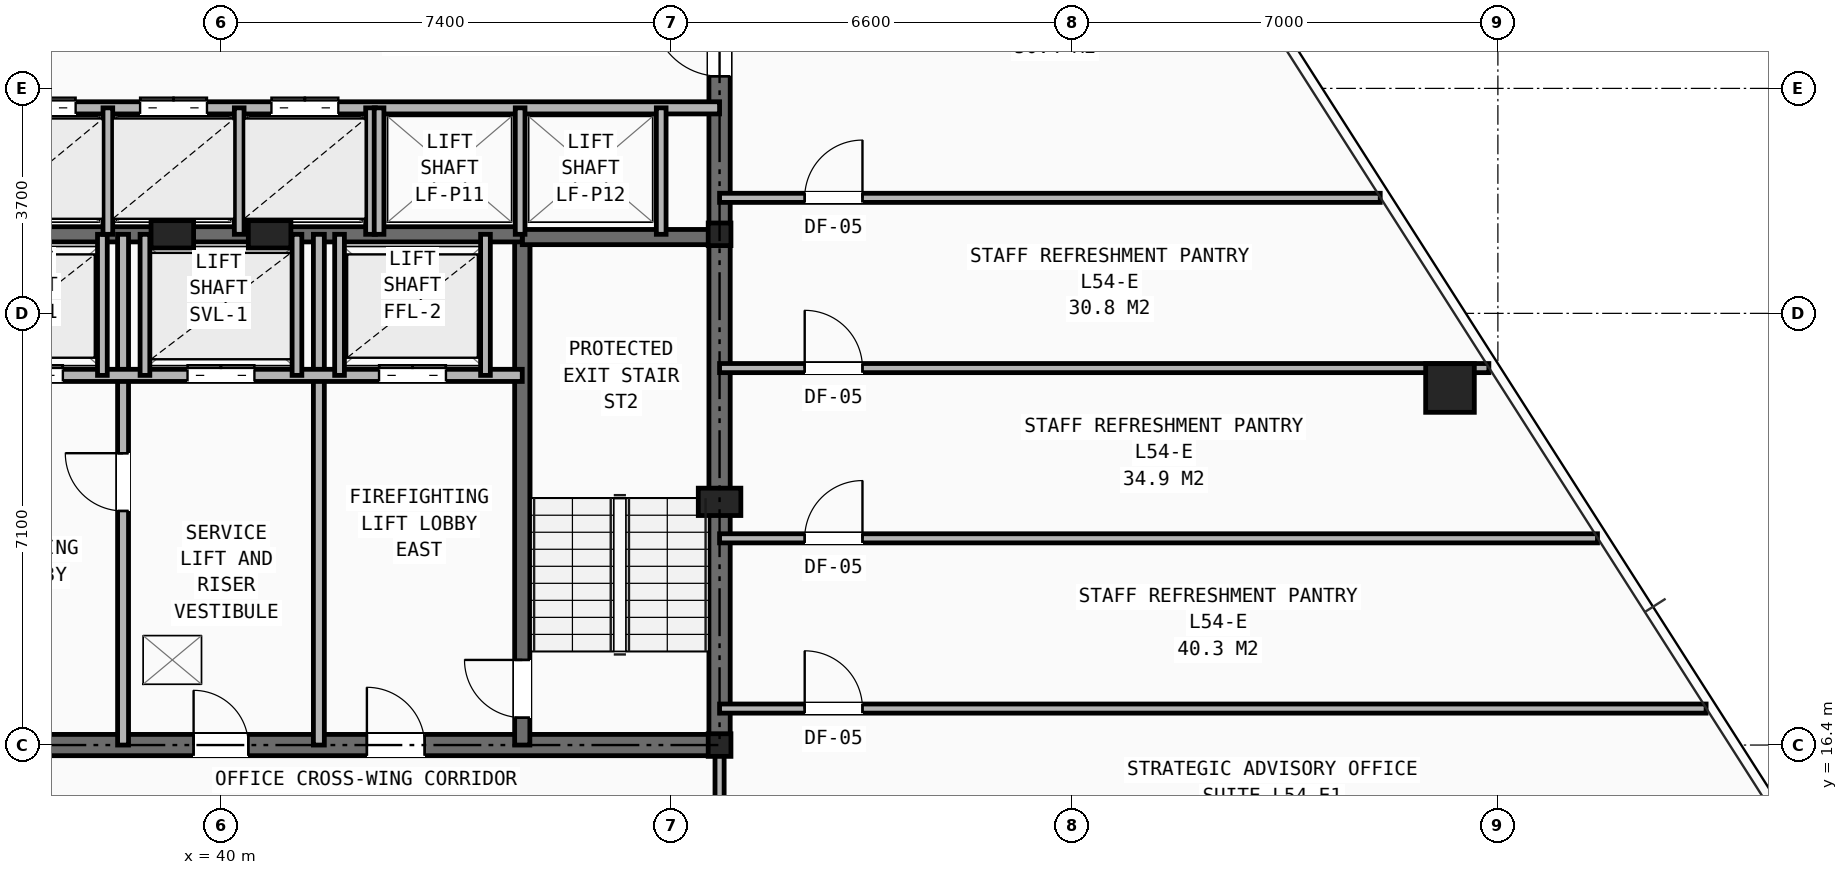
"""IFC4 building model, lengths in metres.
Left out: names, types, materials, properties, quantities, classifications, styles, units other than length and angle.
Written with IfcOpenShell. Run it as: python <this file> out.ifc"""

import sys

from ifc_helpers import new_model, si_unit, direction, frame, frame_2d, origin, origin_2d, place, context, subcontext, project, spatial, rectangle, hollow_rectangle, i_section, extrude, element, fill, save


model = new_model("IFC4")
c1 = context("Model", 3, precision=1e-05, world=origin(), true_north=direction((0.0, 1.0)))
c2 = subcontext(c1, "Body", "Model", "MODEL_VIEW")
j1 = project(units=[si_unit("LENGTHUNIT", "METRE"), si_unit("PLANEANGLEUNIT", "RADIAN")], contexts=[c1])
p1 = place(None, origin())
s1 = spatial("IfcSite", under=j1, at=p1, CompositionType="ELEMENT")
p2 = place(p1, origin())
s2 = spatial("IfcBuilding", under=s1, at=p2, CompositionType="ELEMENT")
p3 = place(p2, frame((0.0, 0.0, 189.6)))
s3 = spatial("IfcBuildingStorey", under=s2, at=p3, CompositionType="ELEMENT", Elevation=189.6)
for number, where, z_axis, x_axis in (
    (1, (48.2, 16.4, 0.0), (0.0, 0.0, 1.0), (1.0, 0.0, 0.0)),
    (2, (48.2, 24.8, 0.0), (0.0, 0.0, 1.0), (1.0, 0.0, 0.0)),
):
    element("IfcColumn", number, at=place(p3, frame(where, z_axis=z_axis, x_axis=x_axis)), inside=s3, PredefinedType="COLUMN", context=c2, shape_type="SweptSolid", body=[
        extrude(i_section(OverallWidth=0.374, OverallDepth=0.372, WebThickness=0.016, FlangeThickness=0.026, at=origin_2d()), origin(), (0.0, 0.0, 1.0), 3.45),
    ])
for number, where, z_axis, x_axis in (
    (3, (48.2, 20.4, 0.0), (0.0, 0.0, 1.0), (1.0, 0.0, 0.0)),
    (4, (39.2, 24.8, 0.0), (0.0, 0.0, 1.0), (1.0, 0.0, 0.0)),
    (5, (40.8, 24.8, 0.0), (0.0, 0.0, 1.0), (1.0, 0.0, 0.0)),
):
    element("IfcColumn", number, at=place(p3, frame(where, z_axis=z_axis, x_axis=x_axis)), inside=s3, PredefinedType="PILASTER", context=c2, shape_type="SweptSolid", body=[
        extrude(rectangle(XDim=0.7, YDim=0.45, at=origin_2d()), origin(), (0.0, 0.0, 1.0), 3.45),
    ])
p4 = place(p3, frame((60.212, 22.272, 0.0), z_axis=(0.0, 0.0, 1.0), x_axis=(1.0, 0.0, 0.0)))
e6 = element("IfcColumn", 6, at=p4, inside=s3, PredefinedType="COLUMN", context=c2, shape_type="SweptSolid", body=[
    extrude(hollow_rectangle(XDim=0.8, YDim=0.8, WallThickness=0.055, at=origin_2d()), origin(), (0.0, 0.0, 1.0), 3.45),
])
p5 = place(p3, frame((31.8, 16.4, 0.0), z_axis=(0.0, 0.0, 1.0), x_axis=(1.0, 0.0, 0.0)))
e7 = element("IfcWall", 7, at=p5, inside=s3, PredefinedType="SHEAR", context=c2, shape_type="SweptSolid", body=[
    extrude(rectangle(XDim=16.4, YDim=0.35, at=frame_2d((8.2, 0.0))), origin(), (0.0, 0.0, 1.0), 3.21),
])
p6 = place(p5, frame((7.75, 0.0, 0.0)))
e8 = element("IfcOpeningElement", 8, at=p6, cuts=e7, PredefinedType="OPENING", context=c2, shape_type="SweptSolid", body=[
    extrude(rectangle(XDim=0.9, YDim=2.1, at=frame_2d((0.45, 1.05))), frame((0.0, 0.185, 0.0), z_axis=(0.0, -1.0, 0.0), x_axis=(1.0, 0.0, 0.0)), (0.0, 0.0, 1.0), 0.37),
])
p7 = place(p5, frame((4.2, 0.0, 0.0)))
e9 = element("IfcOpeningElement", 9, at=p7, cuts=e7, PredefinedType="OPENING", context=c2, shape_type="SweptSolid", body=[
    extrude(rectangle(XDim=0.95, YDim=2.1, at=frame_2d((0.475, 1.05))), frame((0.0, 0.185, 0.0), z_axis=(0.0, -1.0, 0.0), x_axis=(1.0, 0.0, 0.0)), (0.0, 0.0, 1.0), 0.37),
])
p8 = place(p5, frame((10.6, 0.0, 0.0)))
e10 = element("IfcOpeningElement", 10, at=p8, cuts=e7, PredefinedType="OPENING", context=c2, shape_type="SweptSolid", body=[
    extrude(rectangle(XDim=0.95, YDim=2.1, at=frame_2d((0.475, 1.05))), frame((0.0, 0.185, 0.0), z_axis=(0.0, -1.0, 0.0), x_axis=(1.0, 0.0, 0.0)), (0.0, 0.0, 1.0), 0.37),
])
p9 = place(p3, frame((48.2, 16.4, 0.0), z_axis=(0.0, 0.0, 1.0), x_axis=(0.0, 1.0, 0.0)))
e11 = element("IfcWall", 11, at=p9, inside=s3, PredefinedType="SHEAR", context=c2, shape_type="SweptSolid", body=[
    extrude(rectangle(XDim=14.8, YDim=0.35, at=frame_2d((7.4, 0.0))), origin(), (0.0, 0.0, 1.0), 3.21),
])
p10 = place(p9, frame((11.0, 0.0, 0.0)))
e12 = element("IfcOpeningElement", 12, at=p10, cuts=e11, PredefinedType="OPENING", context=c2, shape_type="SweptSolid", body=[
    extrude(rectangle(XDim=1.1, YDim=2.15, at=frame_2d((0.55, 1.075))), frame((0.0, 0.185, 0.0), z_axis=(0.0, -1.0, 0.0), x_axis=(1.0, 0.0, 0.0)), (0.0, 0.0, 1.0), 0.37),
])
p11 = place(p3, frame((44.955, 16.4, 0.0), z_axis=(0.0, 0.0, 1.0), x_axis=(0.0, 1.0, 0.0)))
e13 = element("IfcWall", 13, at=p11, inside=s3, PredefinedType="SHEAR", context=c2, shape_type="SweptSolid", body=[
    extrude(rectangle(XDim=8.4, YDim=0.25, at=frame_2d((4.2, 0.0))), origin(), (0.0, 0.0, 1.0), 3.21),
])
p12 = place(p11, frame((0.45, 0.0, 0.0)))
e14 = element("IfcOpeningElement", 14, at=p12, cuts=e13, PredefinedType="OPENING", context=c2, shape_type="SweptSolid", body=[
    extrude(rectangle(XDim=0.95, YDim=2.1, at=frame_2d((0.475, 1.05))), frame((0.0, 0.135, 0.0), z_axis=(0.0, -1.0, 0.0), x_axis=(1.0, 0.0, 0.0)), (0.0, 0.0, 1.0), 0.27),
])
p13 = place(p3, frame((44.955, 24.755, 0.0), z_axis=(0.0, 0.0, 1.0), x_axis=(1.0, 0.0, 0.0)))
e15 = element("IfcWall", 15, at=p13, inside=s3, PredefinedType="SHEAR", context=c2, shape_type="SweptSolid", body=[
    extrude(rectangle(XDim=3.245, YDim=0.25, at=frame_2d((1.623, 0.0))), origin(), (0.0, 0.0, 1.0), 3.21),
])
p14 = place(p3, frame((35.045, 24.8, 0.0), z_axis=(0.0, 0.0, 1.0), x_axis=(1.0, 0.0, 0.0)))
e16 = element("IfcWall", 16, at=p14, inside=s3, PredefinedType="SHEAR", context=c2, shape_type="SweptSolid", body=[
    extrude(rectangle(XDim=9.91, YDim=0.25, at=frame_2d((4.955, 0.0))), origin(), (0.0, 0.0, 1.0), 3.21),
])
p15 = place(p3, frame((38.39, 16.4, 0.0), z_axis=(0.0, 0.0, 1.0), x_axis=(0.0, 1.0, 0.0)))
e17 = element("IfcWall", 17, at=p15, inside=s3, PredefinedType="PARTITIONING", context=c2, shape_type="SweptSolid", body=[
    extrude(rectangle(XDim=8.4, YDim=0.18, at=frame_2d((4.2, 0.0))), origin(), (0.0, 0.0, 1.0), 2.665),
])
p16 = place(p15, frame((3.85, 0.0, 0.0)))
e18 = element("IfcOpeningElement", 18, at=p16, cuts=e17, PredefinedType="OPENING", context=c2, shape_type="SweptSolid", body=[
    extrude(rectangle(XDim=0.95, YDim=2.1, at=frame_2d((0.475, 1.05))), frame((0.0, 0.1, 0.0), z_axis=(0.0, -1.0, 0.0), x_axis=(1.0, 0.0, 0.0)), (0.0, 0.0, 1.0), 0.2),
])
p17 = place(p3, frame((41.61, 16.4, 0.0), z_axis=(0.0, 0.0, 1.0), x_axis=(0.0, 1.0, 0.0)))
e19 = element("IfcWall", 19, at=p17, inside=s3, PredefinedType="PARTITIONING", context=c2, shape_type="SweptSolid", body=[
    extrude(rectangle(XDim=8.4, YDim=0.18, at=frame_2d((4.2, 0.0))), origin(), (0.0, 0.0, 1.0), 2.665),
])
p18 = place(p3, frame((35.045, 22.48, 0.0), z_axis=(0.0, 0.0, 1.0), x_axis=(1.0, 0.0, 0.0)))
e20 = element("IfcWall", 20, at=p18, inside=s3, PredefinedType="SOLIDWALL", context=c2, shape_type="SweptSolid", body=[
    extrude(rectangle(XDim=9.91, YDim=0.2, at=frame_2d((4.955, 0.0))), origin(), (0.0, 0.0, 1.0), 3.21),
])
p19 = place(p18, frame((1.255, 0.0, 0.0)))
e21 = element("IfcOpeningElement", 21, at=p19, cuts=e20, PredefinedType="OPENING", context=c2, shape_type="SweptSolid", body=[
    extrude(rectangle(XDim=1.1, YDim=2.15, at=frame_2d((0.55, 1.075))), frame((0.0, 0.11, 0.0), z_axis=(0.0, -1.0, 0.0), x_axis=(1.0, 0.0, 0.0)), (0.0, 0.0, 1.0), 0.22),
])
p20 = place(p18, frame((7.555, 0.0, 0.0)))
e22 = element("IfcOpeningElement", 22, at=p20, cuts=e20, PredefinedType="OPENING", context=c2, shape_type="SweptSolid", body=[
    extrude(rectangle(XDim=1.1, YDim=2.15, at=frame_2d((0.55, 1.075))), frame((0.0, 0.11, 0.0), z_axis=(0.0, -1.0, 0.0), x_axis=(1.0, 0.0, 0.0)), (0.0, 0.0, 1.0), 0.22),
])
p21 = place(p18, frame((4.405, 0.0, 0.0)))
e23 = element("IfcOpeningElement", 23, at=p21, cuts=e20, PredefinedType="OPENING", context=c2, shape_type="SweptSolid", body=[
    extrude(rectangle(XDim=1.1, YDim=2.15, at=frame_2d((0.55, 1.075))), frame((0.0, 0.11, 0.0), z_axis=(0.0, -1.0, 0.0), x_axis=(1.0, 0.0, 0.0)), (0.0, 0.0, 1.0), 0.22),
])
for number, where, z_axis, x_axis in (
    (24, (38.05, 22.48, 0.0), (0.0, 0.0, 1.0), (0.0, 1.0, 0.0)),
    (25, (41.95, 22.48, 0.0), (0.0, 0.0, 1.0), (0.0, 1.0, 0.0)),
    (26, (44.35, 22.48, 0.0), (0.0, 0.0, 1.0), (0.0, 1.0, 0.0)),
    (27, (38.75, 22.48, 0.0), (0.0, 0.0, 1.0), (0.0, 1.0, 0.0)),
    (28, (41.25, 22.48, 0.0), (0.0, 0.0, 1.0), (0.0, 1.0, 0.0)),
):
    element("IfcWall", number, at=place(p3, frame(where, z_axis=z_axis, x_axis=x_axis)), inside=s3, PredefinedType="SOLIDWALL", context=c2, shape_type="SweptSolid", body=[
        extrude(rectangle(XDim=2.32, YDim=0.16, at=frame_2d((1.16, 0.0))), origin(), (0.0, 0.0, 1.0), 3.21),
    ])
p22 = place(p3, frame((31.8, 26.88, 0.0), z_axis=(0.0, 0.0, 1.0), x_axis=(1.0, 0.0, 0.0)))
e29 = element("IfcWall", 29, at=p22, inside=s3, PredefinedType="SOLIDWALL", context=c2, shape_type="SweptSolid", body=[
    extrude(rectangle(XDim=16.4, YDim=0.2, at=frame_2d((8.2, 0.0))), origin(), (0.0, 0.0, 1.0), 2.665),
])
p23 = place(p22, frame((0.55, 0.0, 0.0)))
e30 = element("IfcOpeningElement", 30, at=p23, cuts=e29, PredefinedType="OPENING", context=c2, shape_type="SweptSolid", body=[
    extrude(rectangle(XDim=0.85, YDim=2.05, at=frame_2d((0.425, 1.025))), frame((0.0, 0.11, 0.0), z_axis=(0.0, -1.0, 0.0), x_axis=(1.0, 0.0, 0.0)), (0.0, 0.0, 1.0), 0.22),
])
p24 = place(p22, frame((2.55, 0.0, 0.0)))
e31 = element("IfcOpeningElement", 31, at=p24, cuts=e29, PredefinedType="OPENING", context=c2, shape_type="SweptSolid", body=[
    extrude(rectangle(XDim=1.1, YDim=2.15, at=frame_2d((0.55, 1.075))), frame((0.0, 0.11, 0.0), z_axis=(0.0, -1.0, 0.0), x_axis=(1.0, 0.0, 0.0)), (0.0, 0.0, 1.0), 0.22),
])
p25 = place(p22, frame((4.71, 0.0, 0.0)))
e32 = element("IfcOpeningElement", 32, at=p25, cuts=e29, PredefinedType="OPENING", context=c2, shape_type="SweptSolid", body=[
    extrude(rectangle(XDim=1.1, YDim=2.15, at=frame_2d((0.55, 1.075))), frame((0.0, 0.11, 0.0), z_axis=(0.0, -1.0, 0.0), x_axis=(1.0, 0.0, 0.0)), (0.0, 0.0, 1.0), 0.22),
])
p26 = place(p22, frame((6.87, 0.0, 0.0)))
e33 = element("IfcOpeningElement", 33, at=p26, cuts=e29, PredefinedType="OPENING", context=c2, shape_type="SweptSolid", body=[
    extrude(rectangle(XDim=1.1, YDim=2.15, at=frame_2d((0.55, 1.075))), frame((0.0, 0.11, 0.0), z_axis=(0.0, -1.0, 0.0), x_axis=(1.0, 0.0, 0.0)), (0.0, 0.0, 1.0), 0.22),
])
p27 = place(p22, frame((9.03, 0.0, 0.0)))
e34 = element("IfcOpeningElement", 34, at=p27, cuts=e29, PredefinedType="OPENING", context=c2, shape_type="SweptSolid", body=[
    extrude(rectangle(XDim=1.1, YDim=2.15, at=frame_2d((0.55, 1.075))), frame((0.0, 0.11, 0.0), z_axis=(0.0, -1.0, 0.0), x_axis=(1.0, 0.0, 0.0)), (0.0, 0.0, 1.0), 0.22),
])
for number, where, z_axis, x_axis in (
    (35, (38.14, 24.8, 0.0), (0.0, 0.0, 1.0), (0.0, 1.0, 0.0)),
    (36, (40.3, 24.8, 0.0), (0.0, 0.0, 1.0), (0.0, 1.0, 0.0)),
    (37, (42.46, 24.8, 0.0), (0.0, 0.0, 1.0), (0.0, 1.0, 0.0)),
    (38, (42.6, 24.8, 0.0), (0.0, 0.0, 1.0), (0.0, 1.0, 0.0)),
    (39, (44.92, 24.8, 0.0), (0.0, 0.0, 1.0), (0.0, 1.0, 0.0)),
    (40, (47.24, 24.8, 0.0), (0.0, 0.0, 1.0), (0.0, 1.0, 0.0)),
):
    element("IfcWall", number, at=place(p3, frame(where, z_axis=z_axis, x_axis=x_axis)), inside=s3, PredefinedType="SOLIDWALL", context=c2, shape_type="SweptSolid", body=[
        extrude(rectangle(XDim=2.08, YDim=0.16, at=frame_2d((1.04, 0.0))), origin(), (0.0, 0.0, 1.0), 3.21),
    ])
p28 = place(p3, frame((48.2, 14.1, 0.0), z_axis=(0.0, 0.0, 1.0), x_axis=(0.0, 1.0, 0.0)))
e41 = element("IfcWall", 41, at=p28, inside=s3, PredefinedType="PARTITIONING", context=c2, shape_type="SweptSolid", body=[
    extrude(rectangle(XDim=2.3, YDim=0.15, at=frame_2d((1.15, 0.0))), origin(), (0.0, 0.0, 1.0), 2.665),
])
p29 = place(p3, frame((48.2, 17.0, 0.0), z_axis=(0.0, 0.0, 1.0), x_axis=(1.0, 0.0, 0.0)))
e42 = element("IfcWall", 42, at=p29, inside=s3, PredefinedType="PARTITIONING", context=c2, shape_type="SweptSolid", body=[
    extrude(rectangle(XDim=16.224, YDim=0.15, at=frame_2d((8.112, 0.0))), origin(), (0.0, 0.0, 1.0), 2.589),
])
p30 = place(p29, frame((1.4, 0.0, 0.0)))
e43 = element("IfcOpeningElement", 43, at=p30, cuts=e42, PredefinedType="OPENING", context=c2, shape_type="SweptSolid", body=[
    extrude(rectangle(XDim=0.95, YDim=2.1, at=frame_2d((0.475, 1.05))), frame((0.0, 0.085, 0.0), z_axis=(0.0, -1.0, 0.0), x_axis=(1.0, 0.0, 0.0)), (0.0, 0.0, 1.0), 0.17),
])
p31 = place(p3, frame((48.2, 19.8, 0.0), z_axis=(0.0, 0.0, 1.0), x_axis=(1.0, 0.0, 0.0)))
e44 = element("IfcWall", 44, at=p31, inside=s3, PredefinedType="PARTITIONING", context=c2, shape_type="SweptSolid", body=[
    extrude(rectangle(XDim=14.438, YDim=0.15, at=frame_2d((7.219, 0.0))), origin(), (0.0, 0.0, 1.0), 2.589),
])
p32 = place(p31, frame((1.4, 0.0, 0.0)))
e45 = element("IfcOpeningElement", 45, at=p32, cuts=e44, PredefinedType="OPENING", context=c2, shape_type="SweptSolid", body=[
    extrude(rectangle(XDim=0.95, YDim=2.1, at=frame_2d((0.475, 1.05))), frame((0.0, 0.085, 0.0), z_axis=(0.0, -1.0, 0.0), x_axis=(1.0, 0.0, 0.0)), (0.0, 0.0, 1.0), 0.17),
])
p33 = place(p3, frame((48.2, 22.6, 0.0), z_axis=(0.0, 0.0, 1.0), x_axis=(1.0, 0.0, 0.0)))
e46 = element("IfcWall", 46, at=p33, inside=s3, PredefinedType="PARTITIONING", context=c2, shape_type="SweptSolid", body=[
    extrude(rectangle(XDim=12.652, YDim=0.15, at=frame_2d((6.326, 0.0))), origin(), (0.0, 0.0, 1.0), 2.589),
])
p34 = place(p33, frame((1.4, 0.0, 0.0)))
e47 = element("IfcOpeningElement", 47, at=p34, cuts=e46, PredefinedType="OPENING", context=c2, shape_type="SweptSolid", body=[
    extrude(rectangle(XDim=0.95, YDim=2.1, at=frame_2d((0.475, 1.05))), frame((0.0, 0.085, 0.0), z_axis=(0.0, -1.0, 0.0), x_axis=(1.0, 0.0, 0.0)), (0.0, 0.0, 1.0), 0.17),
])
p35 = place(p3, frame((48.2, 25.4, 0.0), z_axis=(0.0, 0.0, 1.0), x_axis=(1.0, 0.0, 0.0)))
e48 = element("IfcWall", 48, at=p35, inside=s3, PredefinedType="PARTITIONING", context=c2, shape_type="SweptSolid", body=[
    extrude(rectangle(XDim=10.865, YDim=0.15, at=frame_2d((5.433, 0.0))), origin(), (0.0, 0.0, 1.0), 2.589),
])
p36 = place(p35, frame((1.4, 0.0, 0.0)))
e49 = element("IfcOpeningElement", 49, at=p36, cuts=e48, PredefinedType="OPENING", context=c2, shape_type="SweptSolid", body=[
    extrude(rectangle(XDim=0.95, YDim=2.1, at=frame_2d((0.475, 1.05))), frame((0.0, 0.085, 0.0), z_axis=(0.0, -1.0, 0.0), x_axis=(1.0, 0.0, 0.0)), (0.0, 0.0, 1.0), 0.17),
])
p37 = place(p6, origin())
e50 = element("IfcDoor", 50, at=p37, inside=s3, OperationType="SINGLE_SWING_LEFT", PredefinedType="DOOR", context=c2, shape_type="SweptSolid", body=[
    extrude(rectangle(XDim=0.9, YDim=2.1, at=frame_2d((0.45, 1.05))), frame((0.0, 0.025, 0.0), z_axis=(0.0, -1.0, 0.0), x_axis=(1.0, 0.0, 0.0)), (0.0, 0.0, 1.0), 0.05),
])
fill(e8, e50)
p38 = place(p16, origin())
e51 = element("IfcDoor", 51, at=p38, inside=s3, OperationType="SINGLE_SWING_RIGHT", PredefinedType="DOOR", context=c2, shape_type="SweptSolid", body=[
    extrude(rectangle(XDim=0.95, YDim=2.1, at=frame_2d((0.475, 1.05))), frame((0.0, 0.025, 0.0), z_axis=(0.0, -1.0, 0.0), x_axis=(1.0, 0.0, 0.0)), (0.0, 0.0, 1.0), 0.05),
])
fill(e18, e51)
p39 = place(p12, origin())
e52 = element("IfcDoor", 52, at=p39, inside=s3, OperationType="SINGLE_SWING_RIGHT", PredefinedType="DOOR", context=c2, shape_type="SweptSolid", body=[
    extrude(rectangle(XDim=0.95, YDim=2.1, at=frame_2d((0.475, 1.05))), frame((0.0, 0.025, 0.0), z_axis=(0.0, -1.0, 0.0), x_axis=(1.0, 0.0, 0.0)), (0.0, 0.0, 1.0), 0.05),
])
fill(e14, e52)
p40 = place(p8, origin())
e53 = element("IfcDoor", 53, at=p40, inside=s3, OperationType="SINGLE_SWING_LEFT", PredefinedType="DOOR", context=c2, shape_type="SweptSolid", body=[
    extrude(rectangle(XDim=0.95, YDim=2.1, at=frame_2d((0.475, 1.05))), frame((0.0, 0.025, 0.0), z_axis=(0.0, -1.0, 0.0), x_axis=(1.0, 0.0, 0.0)), (0.0, 0.0, 1.0), 0.05),
])
fill(e10, e53)
p41 = place(p19, origin())
e54 = element("IfcDoor", 54, at=p41, inside=s3, OperationType="DOUBLE_DOOR_SLIDING", PredefinedType="DOOR", context=c2, shape_type="SweptSolid", body=[
    extrude(rectangle(XDim=1.1, YDim=2.15, at=frame_2d((0.55, 1.075))), frame((0.0, 0.025, 0.0), z_axis=(0.0, -1.0, 0.0), x_axis=(1.0, 0.0, 0.0)), (0.0, 0.0, 1.0), 0.05),
])
fill(e21, e54)
p42 = place(p20, origin())
e55 = element("IfcDoor", 55, at=p42, inside=s3, OperationType="DOUBLE_DOOR_SLIDING", PredefinedType="DOOR", context=c2, shape_type="SweptSolid", body=[
    extrude(rectangle(XDim=1.1, YDim=2.15, at=frame_2d((0.55, 1.075))), frame((0.0, 0.025, 0.0), z_axis=(0.0, -1.0, 0.0), x_axis=(1.0, 0.0, 0.0)), (0.0, 0.0, 1.0), 0.05),
])
fill(e22, e55)
p43 = place(p21, origin())
e56 = element("IfcDoor", 56, at=p43, inside=s3, OperationType="DOUBLE_DOOR_SLIDING", PredefinedType="DOOR", context=c2, shape_type="SweptSolid", body=[
    extrude(rectangle(XDim=1.1, YDim=2.15, at=frame_2d((0.55, 1.075))), frame((0.0, 0.025, 0.0), z_axis=(0.0, -1.0, 0.0), x_axis=(1.0, 0.0, 0.0)), (0.0, 0.0, 1.0), 0.05),
])
fill(e23, e56)
p44 = place(p10, origin())
e57 = element("IfcDoor", 57, at=p44, inside=s3, OperationType="SINGLE_SWING_RIGHT", PredefinedType="DOOR", context=c2, shape_type="SweptSolid", body=[
    extrude(rectangle(XDim=1.1, YDim=2.15, at=frame_2d((0.55, 1.075))), frame((0.0, 0.025, 0.0), z_axis=(0.0, -1.0, 0.0), x_axis=(1.0, 0.0, 0.0)), (0.0, 0.0, 1.0), 0.05),
])
fill(e12, e57)
p45 = place(p25, origin())
e58 = element("IfcDoor", 58, at=p45, inside=s3, OperationType="DOUBLE_DOOR_SLIDING", PredefinedType="DOOR", context=c2, shape_type="SweptSolid", body=[
    extrude(rectangle(XDim=1.1, YDim=2.15, at=frame_2d((0.55, 1.075))), frame((0.0, 0.025, 0.0), z_axis=(0.0, -1.0, 0.0), x_axis=(1.0, 0.0, 0.0)), (0.0, 0.0, 1.0), 0.05),
])
fill(e32, e58)
p46 = place(p26, origin())
e59 = element("IfcDoor", 59, at=p46, inside=s3, OperationType="DOUBLE_DOOR_SLIDING", PredefinedType="DOOR", context=c2, shape_type="SweptSolid", body=[
    extrude(rectangle(XDim=1.1, YDim=2.15, at=frame_2d((0.55, 1.075))), frame((0.0, 0.025, 0.0), z_axis=(0.0, -1.0, 0.0), x_axis=(1.0, 0.0, 0.0)), (0.0, 0.0, 1.0), 0.05),
])
fill(e33, e59)
p47 = place(p27, origin())
e60 = element("IfcDoor", 60, at=p47, inside=s3, OperationType="DOUBLE_DOOR_SLIDING", PredefinedType="DOOR", context=c2, shape_type="SweptSolid", body=[
    extrude(rectangle(XDim=1.1, YDim=2.15, at=frame_2d((0.55, 1.075))), frame((0.0, 0.025, 0.0), z_axis=(0.0, -1.0, 0.0), x_axis=(1.0, 0.0, 0.0)), (0.0, 0.0, 1.0), 0.05),
])
fill(e34, e60)
p48 = place(p30, origin())
e61 = element("IfcDoor", 61, at=p48, inside=s3, OperationType="SINGLE_SWING_LEFT", PredefinedType="DOOR", context=c2, shape_type="SweptSolid", body=[
    extrude(rectangle(XDim=0.95, YDim=2.1, at=frame_2d((0.475, 1.05))), frame((0.0, 0.025, 0.0), z_axis=(0.0, -1.0, 0.0), x_axis=(1.0, 0.0, 0.0)), (0.0, 0.0, 1.0), 0.05),
])
fill(e43, e61)
p49 = place(p32, origin())
e62 = element("IfcDoor", 62, at=p49, inside=s3, OperationType="SINGLE_SWING_RIGHT", PredefinedType="DOOR", context=c2, shape_type="SweptSolid", body=[
    extrude(rectangle(XDim=0.95, YDim=2.1, at=frame_2d((0.475, 1.05))), frame((0.0, 0.025, 0.0), z_axis=(0.0, -1.0, 0.0), x_axis=(1.0, 0.0, 0.0)), (0.0, 0.0, 1.0), 0.05),
])
fill(e45, e62)
p50 = place(p34, origin())
e63 = element("IfcDoor", 63, at=p50, inside=s3, OperationType="SINGLE_SWING_LEFT", PredefinedType="DOOR", context=c2, shape_type="SweptSolid", body=[
    extrude(rectangle(XDim=0.95, YDim=2.1, at=frame_2d((0.475, 1.05))), frame((0.0, 0.025, 0.0), z_axis=(0.0, -1.0, 0.0), x_axis=(1.0, 0.0, 0.0)), (0.0, 0.0, 1.0), 0.05),
])
fill(e47, e63)
p51 = place(p36, origin())
e64 = element("IfcDoor", 64, at=p51, inside=s3, OperationType="SINGLE_SWING_RIGHT", PredefinedType="DOOR", context=c2, shape_type="SweptSolid", body=[
    extrude(rectangle(XDim=0.95, YDim=2.1, at=frame_2d((0.475, 1.05))), frame((0.0, 0.025, 0.0), z_axis=(0.0, -1.0, 0.0), x_axis=(1.0, 0.0, 0.0)), (0.0, 0.0, 1.0), 0.05),
])
fill(e49, e64)
save(model, sys.argv[1])
